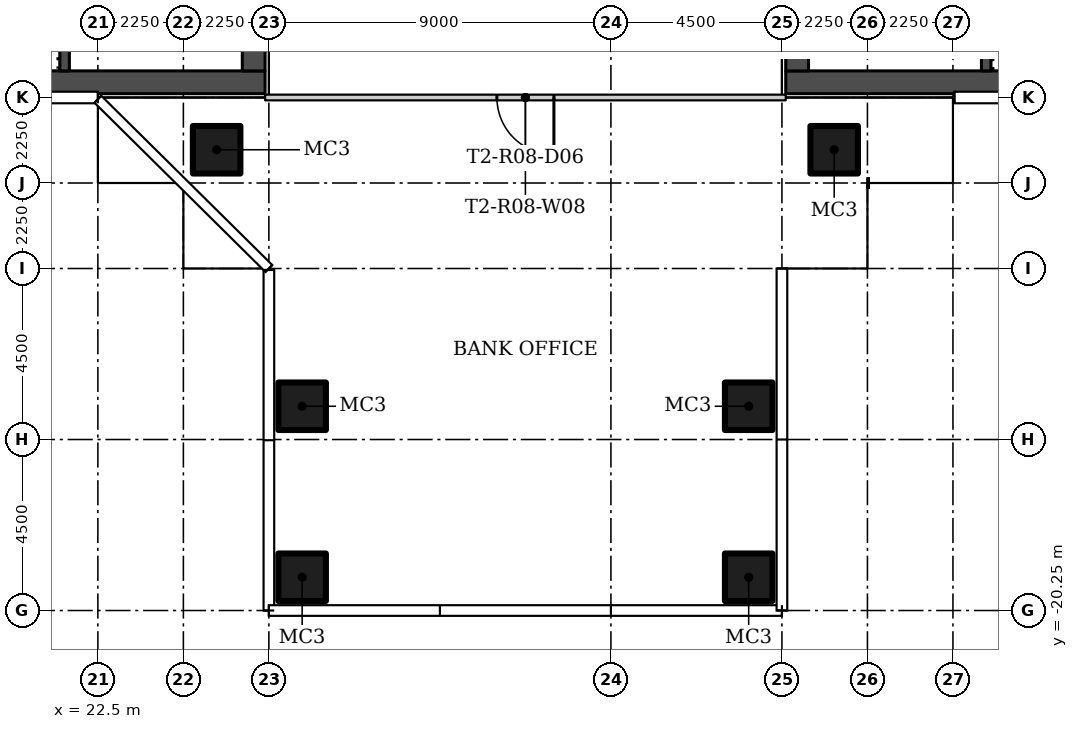
"""IFC4 building model, lengths in metres.
Left out: names, types, materials, properties, quantities, classifications, styles, units other than length and angle.
Written with IfcOpenShell. Run it as: python <this file> out.ifc"""

import sys

from ifc_helpers import new_model, si_unit, direction, frame, frame_2d, origin, origin_2d, place, context, subcontext, project, spatial, rectangle, hollow_rectangle, extrude, element, fill, save


model = new_model("IFC4")
c1 = context("Model", 3, precision=1e-05, world=origin(), true_north=direction((0.0, 1.0)))
c2 = subcontext(c1, "Body", "Model", "MODEL_VIEW")
j1 = project(units=[si_unit("LENGTHUNIT", "METRE"), si_unit("PLANEANGLEUNIT", "RADIAN")], contexts=[c1])
p1 = place(None, origin())
s1 = spatial("IfcSite", under=j1, at=p1, CompositionType="ELEMENT")
p2 = place(p1, origin())
s2 = spatial("IfcBuilding", under=s1, at=p2, CompositionType="ELEMENT")
p3 = place(p2, frame((0.0, 0.0, 85.8)))
s3 = spatial("IfcBuildingStorey", under=s2, at=p3, CompositionType="ELEMENT", Elevation=85.8)
for number, where in (
    (1, (25.625, -8.125, 0.0)),
    (2, (41.875, -8.125, 0.0)),
    (3, (39.625, -14.875, 0.0)),
    (4, (39.625, -19.375, 0.0)),
    (5, (27.875, -14.875, 0.0)),
    (6, (27.875, -19.375, 0.0)),
):
    element("IfcColumn", number, at=place(p3, frame(where)), inside=s3, PredefinedType="COLUMN", context=c2, shape_type="SweptSolid", body=[
        extrude(hollow_rectangle(XDim=1.25, YDim=1.25, WallThickness=0.05, at=origin_2d()), origin(), (0.0, 0.0, 1.0), 3.55),
    ])
p4 = place(p3, frame((40.6, -6.75, 0.0), z_axis=(0.0, 0.0, 1.0), x_axis=(-1.0, 0.0, 0.0)))
e7 = element("IfcWall", 7, at=p4, inside=s3, PredefinedType="PARTITIONING", context=c2, shape_type="SweptSolid", body=[
    extrude(rectangle(XDim=13.7, YDim=0.15, at=frame_2d((6.85, 0.0))), origin(), (0.0, 0.0, 1.0), 3.55),
])
p5 = place(p4, frame((6.1, 0.0, 0.0)))
e8 = element("IfcOpeningElement", 8, at=p5, cuts=e7, PredefinedType="OPENING", context=c2, shape_type="SweptSolid", body=[
    extrude(rectangle(XDim=1.5, YDim=2.1, at=frame_2d((0.75, 1.05))), frame((0.0, 0.085, 0.0), z_axis=(0.0, -1.0, 0.0), x_axis=(1.0, 0.0, 0.0)), (0.0, 0.0, 1.0), 0.17),
])
p6 = place(p3, frame((13.6, -6.35, 0.0)))
e9 = element("IfcWall", 9, at=p6, inside=s3, PredefinedType="SHEAR", context=c2, shape_type="SweptSolid", body=[
    extrude(rectangle(XDim=13.3, YDim=0.6, at=frame_2d((6.65, 0.0))), origin(), (0.0, 0.0, 1.0), 3.55),
])
p7 = place(p3, frame((26.6, 6.05, 0.0), z_axis=(0.0, 0.0, 1.0), x_axis=(0.0, -1.0, 0.0)))
e10 = element("IfcWall", 10, at=p7, inside=s3, PredefinedType="SHEAR", context=c2, shape_type="SweptSolid", body=[
    extrude(rectangle(XDim=12.1, YDim=0.6, at=frame_2d((6.05, 0.0))), origin(), (0.0, 0.0, 1.0), 3.55),
])
p8 = place(p7, frame((10.1, 0.0, 0.0)))
e11 = element("IfcOpeningElement", 11, at=p8, cuts=e10, PredefinedType="OPENING", context=c2, shape_type="SweptSolid", body=[
    extrude(rectangle(XDim=1.2, YDim=2.1, at=frame_2d((0.6, 1.05))), frame((0.0, 0.31, 0.0), z_axis=(0.0, -1.0, 0.0), x_axis=(1.0, 0.0, 0.0)), (0.0, 0.0, 1.0), 0.62),
])
p9 = place(p7, frame((3.9, 0.0, 0.0)))
e12 = element("IfcOpeningElement", 12, at=p9, cuts=e10, PredefinedType="OPENING", context=c2, shape_type="SweptSolid", body=[
    extrude(rectangle(XDim=1.8, YDim=2.4, at=frame_2d((0.9, 1.2))), frame((0.0, 0.31, 0.0), z_axis=(0.0, -1.0, 0.0), x_axis=(1.0, 0.0, 0.0)), (0.0, 0.0, 1.0), 0.62),
])
p10 = place(p3, frame((21.625, -6.05, 0.0), z_axis=(0.0, 0.0, 1.0), x_axis=(0.0, 1.0, 0.0)))
e13 = element("IfcWall", 13, at=p10, inside=s3, PredefinedType="SHEAR", context=c2, shape_type="SweptSolid", body=[
    extrude(rectangle(XDim=2.55, YDim=0.25, at=frame_2d((1.275, 0.0))), origin(), (0.0, 0.0, 1.0), 3.55),
])
p11 = place(p3, frame((53.9, -6.35, 0.0), z_axis=(0.0, 0.0, 1.0), x_axis=(-1.0, 0.0, 0.0)))
e14 = element("IfcWall", 14, at=p11, inside=s3, PredefinedType="SHEAR", context=c2, shape_type="SweptSolid", body=[
    extrude(rectangle(XDim=13.3, YDim=0.6, at=frame_2d((6.65, 0.0))), origin(), (0.0, 0.0, 1.0), 3.55),
])
p12 = place(p3, frame((40.9, -6.05, 0.0), z_axis=(0.0, 0.0, 1.0), x_axis=(0.0, 1.0, 0.0)))
e15 = element("IfcWall", 15, at=p12, inside=s3, PredefinedType="SHEAR", context=c2, shape_type="SweptSolid", body=[
    extrude(rectangle(XDim=12.1, YDim=0.6, at=frame_2d((6.05, 0.0))), origin(), (0.0, 0.0, 1.0), 3.55),
])
p13 = place(p12, frame((0.8, 0.0, 0.0)))
e16 = element("IfcOpeningElement", 16, at=p13, cuts=e15, PredefinedType="OPENING", context=c2, shape_type="SweptSolid", body=[
    extrude(rectangle(XDim=1.2, YDim=2.1, at=frame_2d((0.6, 1.05))), frame((0.0, 0.31, 0.0), z_axis=(0.0, -1.0, 0.0), x_axis=(1.0, 0.0, 0.0)), (0.0, 0.0, 1.0), 0.62),
])
p14 = place(p12, frame((6.4, 0.0, 0.0)))
e17 = element("IfcOpeningElement", 17, at=p14, cuts=e15, PredefinedType="OPENING", context=c2, shape_type="SweptSolid", body=[
    extrude(rectangle(XDim=1.8, YDim=2.4, at=frame_2d((0.9, 1.2))), frame((0.0, 0.31, 0.0), z_axis=(0.0, -1.0, 0.0), x_axis=(1.0, 0.0, 0.0)), (0.0, 0.0, 1.0), 0.62),
])
p15 = place(p3, frame((45.875, -6.05, 0.0), z_axis=(0.0, 0.0, 1.0), x_axis=(0.0, 1.0, 0.0)))
e18 = element("IfcWall", 18, at=p15, inside=s3, PredefinedType="SHEAR", context=c2, shape_type="SweptSolid", body=[
    extrude(rectangle(XDim=2.55, YDim=0.25, at=frame_2d((1.275, 0.0))), origin(), (0.0, 0.0, 1.0), 3.55),
])
p16 = place(p5, origin())
e19 = element("IfcDoor", 19, at=p16, inside=s3, OperationType="DOUBLE_DOOR_SINGLE_SWING", PredefinedType="DOOR", context=c2, shape_type="SweptSolid", body=[
    extrude(rectangle(XDim=1.5, YDim=2.1, at=frame_2d((0.75, 1.05))), frame((0.0, 0.025, 0.0), z_axis=(0.0, -1.0, 0.0), x_axis=(1.0, 0.0, 0.0)), (0.0, 0.0, 1.0), 0.05),
])
fill(e8, e19)
save(model, sys.argv[1])
